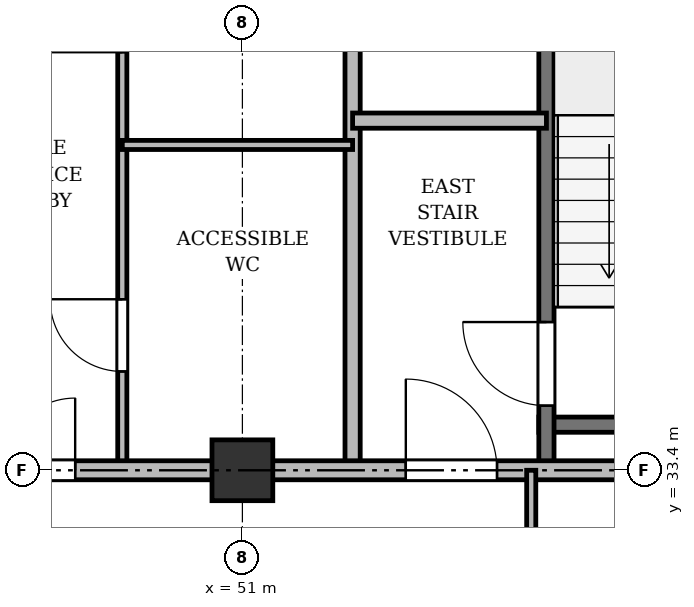
"""IFC4 building model, lengths in metres.
Left out: names, types, materials, properties, quantities, classifications, styles, units other than length and angle.
Written with IfcOpenShell. Run it as: python <this file> out.ifc"""

import sys

from ifc_helpers import new_model, si_unit, direction, frame, frame_2d, origin, origin_2d, place, context, subcontext, project, spatial, rectangle, extrude, source, transform, mapped, element, fill, save


model = new_model("IFC4")
c1 = context("Model", 3, precision=1e-05, world=origin(), true_north=direction((0.0, 1.0)))
c2 = subcontext(c1, "Body", "Model", "MODEL_VIEW")
j1 = project(units=[si_unit("LENGTHUNIT", "METRE"), si_unit("PLANEANGLEUNIT", "RADIAN")], contexts=[c1])
p1 = place(None, origin())
s1 = spatial("IfcSite", under=j1, at=p1, CompositionType="ELEMENT")
p2 = place(p1, origin())
s2 = spatial("IfcBuilding", under=s1, at=p2, CompositionType="ELEMENT")
p3 = place(p2, frame((0.0, 0.0, 106.9)))
s3 = spatial("IfcBuildingStorey", under=s2, at=p3, CompositionType="ELEMENT", Elevation=106.9)
m1 = source(origin(), c2, "Body", "SweptSolid", [
    extrude(rectangle(XDim=0.8, YDim=0.8, at=origin_2d()), origin(), (0.0, 0.0, 1.0), 3.6),
])
p4 = place(p3, frame((51.0, 33.4, 0.0), z_axis=(0.0, 0.0, 1.0), x_axis=(1.0, 0.0, 0.0)))
e1 = element("IfcColumn", 1, at=p4, inside=s3, PredefinedType="COLUMN", context=c2, shape_type="MappedRepresentation", body=[
    mapped(m1, transform((0.0, 0.0, 0.0), x_axis=(1.0, 0.0, 0.0), y_axis=(0.0, 1.0, 0.0), z_axis=(0.0, 0.0, 1.0), scale=1.0)),
])
p5 = place(p3, frame((54.9, 34.0, 0.0), z_axis=(0.0, 0.0, 1.0), x_axis=(1.0, 0.0, 0.0)))
e2 = element("IfcWall", 2, at=p5, inside=s3, PredefinedType="SHEAR", context=c2, shape_type="SweptSolid", body=[
    extrude(rectangle(XDim=3.4, YDim=0.2, at=frame_2d((1.7, 0.0))), origin(), (0.0, 0.0, 1.0), 3.34),
])
p6 = place(p3, frame((55.0, 33.4, 0.0), z_axis=(0.0, 0.0, 1.0), x_axis=(0.0, 1.0, 0.0)))
e3 = element("IfcWall", 3, at=p6, inside=s3, PredefinedType="SHEAR", context=c2, shape_type="SweptSolid", body=[
    extrude(rectangle(XDim=11.1, YDim=0.2, at=frame_2d((5.55, 0.0))), origin(), (0.0, 0.0, 1.0), 3.34),
])
p7 = place(p6, frame((0.85, 0.0, 0.0)))
e4 = element("IfcOpeningElement", 4, at=p7, cuts=e3, PredefinedType="OPENING", context=c2, shape_type="SweptSolid", body=[
    extrude(rectangle(XDim=1.1, YDim=2.15, at=frame_2d((0.55, 1.075))), frame((0.0, 0.11, 0.0), z_axis=(0.0, -1.0, 0.0), x_axis=(1.0, 0.0, 0.0)), (0.0, 0.0, 1.0), 0.22),
])
p8 = place(p3, frame((52.45, 33.4, 0.0), z_axis=(0.0, 0.0, 1.0), x_axis=(0.0, 1.0, 0.0)))
e5 = element("IfcWall", 5, at=p8, inside=s3, PredefinedType="PARTITIONING", context=c2, shape_type="SweptSolid", body=[
    extrude(rectangle(XDim=8.65, YDim=0.2, at=frame_2d((4.325, 0.0))), origin(), (0.0, 0.0, 1.0), 2.752),
])
p9 = place(p8, frame((6.2, 0.0, 0.0)))
e6 = element("IfcOpeningElement", 6, at=p9, cuts=e5, PredefinedType="OPENING", context=c2, shape_type="SweptSolid", body=[
    extrude(rectangle(XDim=0.95, YDim=2.15, at=frame_2d((0.475, 1.075))), frame((0.0, 0.11, 0.0), z_axis=(0.0, -1.0, 0.0), x_axis=(1.0, 0.0, 0.0)), (0.0, 0.0, 1.0), 0.22),
])
p10 = place(p3, frame((52.45, 38.0, 0.0), z_axis=(0.0, 0.0, 1.0), x_axis=(1.0, 0.0, 0.0)))
e7 = element("IfcWall", 7, at=p10, inside=s3, PredefinedType="PARTITIONING", context=c2, shape_type="SweptSolid", body=[
    extrude(rectangle(XDim=2.55, YDim=0.2, at=frame_2d((1.275, 0.0))), origin(), (0.0, 0.0, 1.0), 3.34),
])
p11 = place(p3, frame((49.42, 33.4, 0.0), z_axis=(0.0, 0.0, 1.0), x_axis=(0.0, 1.0, 0.0)))
e8 = element("IfcWall", 8, at=p11, inside=s3, PredefinedType="PARTITIONING", context=c2, shape_type="SweptSolid", body=[
    extrude(rectangle(XDim=8.6, YDim=0.12, at=frame_2d((4.3, 0.0))), origin(), (0.0, 0.0, 1.0), 2.752),
])
p12 = place(p11, frame((1.3, 0.0, 0.0)))
e9 = element("IfcOpeningElement", 9, at=p12, cuts=e8, PredefinedType="OPENING", context=c2, shape_type="SweptSolid", body=[
    extrude(rectangle(XDim=0.95, YDim=2.15, at=frame_2d((0.475, 1.075))), frame((0.0, 0.07, 0.0), z_axis=(0.0, -1.0, 0.0), x_axis=(1.0, 0.0, 0.0)), (0.0, 0.0, 1.0), 0.14),
])
p13 = place(p11, frame((5.5, 0.0, 0.0)))
e10 = element("IfcOpeningElement", 10, at=p13, cuts=e8, PredefinedType="OPENING", context=c2, shape_type="SweptSolid", body=[
    extrude(rectangle(XDim=0.95, YDim=2.15, at=frame_2d((0.475, 1.075))), frame((0.0, 0.07, 0.0), z_axis=(0.0, -1.0, 0.0), x_axis=(1.0, 0.0, 0.0)), (0.0, 0.0, 1.0), 0.14),
])
p14 = place(p3, frame((49.42, 37.68, 0.0), z_axis=(0.0, 0.0, 1.0), x_axis=(1.0, 0.0, 0.0)))
e11 = element("IfcWall", 11, at=p14, inside=s3, PredefinedType="PARTITIONING", context=c2, shape_type="SweptSolid", body=[
    extrude(rectangle(XDim=3.03, YDim=0.12, at=frame_2d((1.515, 0.0))), origin(), (0.0, 0.0, 1.0), 2.84),
])
p15 = place(p3, frame((47.15, 33.4, 0.0), z_axis=(0.0, 0.0, 1.0), x_axis=(1.0, 0.0, 0.0)))
e12 = element("IfcWall", 12, at=p15, inside=s3, PredefinedType="PARTITIONING", context=c2, shape_type="SweptSolid", body=[
    extrude(rectangle(XDim=11.15, YDim=0.25, at=frame_2d((5.575, 0.0))), origin(), (0.0, 0.0, 1.0), 2.752),
])
p16 = place(p15, frame((0.7, 0.0, 0.0)))
e13 = element("IfcOpeningElement", 13, at=p16, cuts=e12, PredefinedType="OPENING", context=c2, shape_type="SweptSolid", body=[
    extrude(rectangle(XDim=0.95, YDim=2.15, at=frame_2d((0.475, 1.075))), frame((0.0, 0.135, 0.0), z_axis=(0.0, -1.0, 0.0), x_axis=(1.0, 0.0, 0.0)), (0.0, 0.0, 1.0), 0.27),
])
p17 = place(p15, frame((6.0, 0.0, 0.0)))
e14 = element("IfcOpeningElement", 14, at=p17, cuts=e12, PredefinedType="OPENING", context=c2, shape_type="SweptSolid", body=[
    extrude(rectangle(XDim=1.2, YDim=2.15, at=frame_2d((0.6, 1.075))), frame((0.0, 0.135, 0.0), z_axis=(0.0, -1.0, 0.0), x_axis=(1.0, 0.0, 0.0)), (0.0, 0.0, 1.0), 0.27),
])
p18 = place(p3, frame((54.8, 29.8, 0.0), z_axis=(0.0, 0.0, 1.0), x_axis=(0.0, 1.0, 0.0)))
e15 = element("IfcWall", 15, at=p18, inside=s3, PredefinedType="PARTITIONING", context=c2, shape_type="SweptSolid", body=[
    extrude(rectangle(XDim=3.6, YDim=0.12, at=frame_2d((1.8, 0.0))), origin(), (0.0, 0.0, 1.0), 2.752),
])
m2 = source(origin(), c2, "Body", "SweptSolid", [
    extrude(rectangle(XDim=1.1, YDim=2.15, at=frame_2d((0.55, 1.075))), frame((0.0, 0.025, 0.0), z_axis=(0.0, -1.0, 0.0), x_axis=(1.0, 0.0, 0.0)), (0.0, 0.0, 1.0), 0.05),
])
p19 = place(p7, origin())
e16 = element("IfcDoor", 16, at=p19, inside=s3, OperationType="SINGLE_SWING_RIGHT", PredefinedType="DOOR", context=c2, shape_type="MappedRepresentation", body=[
    mapped(m2, transform((0.0, 0.0, 0.0), x_axis=(1.0, 0.0, 0.0), y_axis=(0.0, 1.0, 0.0), z_axis=(0.0, 0.0, 1.0), scale=1.0)),
])
fill(e4, e16)
m3 = source(origin(), c2, "Body", "SweptSolid", [
    extrude(rectangle(XDim=0.95, YDim=2.15, at=frame_2d((0.475, 1.075))), frame((0.0, 0.025, 0.0), z_axis=(0.0, -1.0, 0.0), x_axis=(1.0, 0.0, 0.0)), (0.0, 0.0, 1.0), 0.05),
])
p20 = place(p12, origin())
e17 = element("IfcDoor", 17, at=p20, inside=s3, OperationType="SINGLE_SWING_RIGHT", PredefinedType="DOOR", context=c2, shape_type="MappedRepresentation", body=[
    mapped(m3, transform((0.0, 0.0, 0.0), x_axis=(1.0, 0.0, 0.0), y_axis=(0.0, 1.0, 0.0), z_axis=(0.0, 0.0, 1.0), scale=1.0)),
])
fill(e9, e17)
p21 = place(p16, origin())
e18 = element("IfcDoor", 18, at=p21, inside=s3, OperationType="SINGLE_SWING_RIGHT", PredefinedType="DOOR", context=c2, shape_type="MappedRepresentation", body=[
    mapped(m3, transform((0.0, 0.0, 0.0), x_axis=(1.0, 0.0, 0.0), y_axis=(0.0, 1.0, 0.0), z_axis=(0.0, 0.0, 1.0), scale=1.0)),
])
fill(e13, e18)
m4 = source(origin(), c2, "Body", "SweptSolid", [
    extrude(rectangle(XDim=1.2, YDim=2.15, at=frame_2d((0.6, 1.075))), frame((0.0, 0.025, 0.0), z_axis=(0.0, -1.0, 0.0), x_axis=(1.0, 0.0, 0.0)), (0.0, 0.0, 1.0), 0.05),
])
p22 = place(p17, origin())
e19 = element("IfcDoor", 19, at=p22, inside=s3, OperationType="SINGLE_SWING_LEFT", PredefinedType="DOOR", context=c2, shape_type="MappedRepresentation", body=[
    mapped(m4, transform((0.0, 0.0, 0.0), x_axis=(1.0, 0.0, 0.0), y_axis=(0.0, 1.0, 0.0), z_axis=(0.0, 0.0, 1.0), scale=1.0)),
])
fill(e14, e19)
save(model, sys.argv[1])
